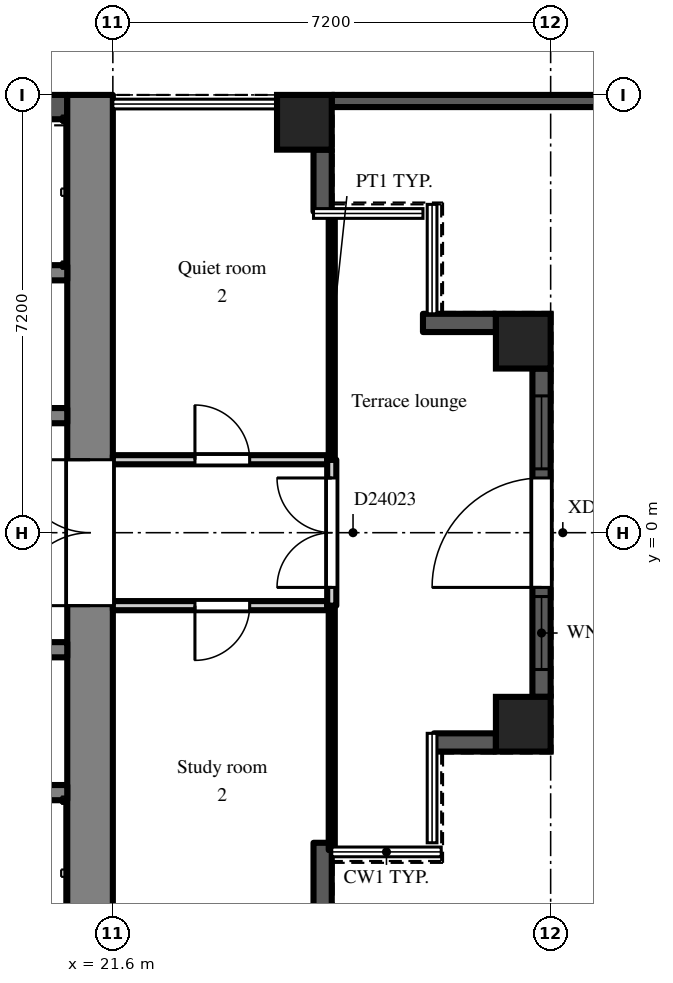
"""IFC4 building model, lengths in metres.
Left out: names, types, materials, properties, quantities, classifications, styles, units other than length and angle.
Written with IfcOpenShell. Run it as: python <this file> out.ifc"""

import sys

from ifc_helpers import new_model, si_unit, direction, frame, frame_2d, origin, origin_2d, place, context, subcontext, project, spatial, rectangle, extrude, element, fill, save


model = new_model("IFC4")
c1 = context("Model", 3, precision=1e-05, world=origin(), true_north=direction((0.0, 1.0)))
c2 = subcontext(c1, "Body", "Model", "MODEL_VIEW")
j1 = project(units=[si_unit("LENGTHUNIT", "METRE"), si_unit("PLANEANGLEUNIT", "RADIAN")], contexts=[c1])
p1 = place(None, origin())
s1 = spatial("IfcSite", under=j1, at=p1, CompositionType="ELEMENT")
p2 = place(p1, origin())
s2 = spatial("IfcBuilding", under=s1, at=p2, CompositionType="ELEMENT")
p3 = place(p2, frame((0.0, 0.0, 166.5)))
s3 = spatial("IfcBuildingStorey", under=s2, at=p3, CompositionType="ELEMENT", Elevation=166.5)
for number, where, z_axis, x_axis in (
    (1, (24.75, 6.75, 0.0), (0.0, 0.0, 1.0), (1.0, 0.0, 0.0)),
    (2, (28.35, -3.15, 0.0), (0.0, 0.0, 1.0), (1.0, 0.0, 0.0)),
    (3, (28.35, 3.15, 0.0), (0.0, 0.0, 1.0), (1.0, 0.0, 0.0)),
):
    element("IfcColumn", number, at=place(p3, frame(where, z_axis=z_axis, x_axis=x_axis)), inside=s3, PredefinedType="COLUMN", context=c2, shape_type="SweptSolid", body=[
        extrude(rectangle(XDim=0.9, YDim=0.9, at=origin_2d()), origin(), (0.0, 0.0, 1.0), 4.2),
    ])
p4 = place(p3, frame((25.05, -6.3, 0.0), z_axis=(0.0, 0.0, 1.0), x_axis=(0.0, 1.0, 0.0)))
e4 = element("IfcWall", 4, at=p4, inside=s3, PredefinedType="SOLIDWALL", context=c2, shape_type="SweptSolid", body=[
    extrude(rectangle(XDim=1.2, YDim=0.3, at=frame_2d((0.6, 0.0))), origin(), (0.0, 0.0, 1.0), 3.8),
])
p5 = place(p3, frame((26.88, -3.45, 0.0), z_axis=(0.0, 0.0, 1.0), x_axis=(1.0, 0.0, 0.0)))
e5 = element("IfcWall", 5, at=p5, inside=s3, PredefinedType="SOLIDWALL", context=c2, shape_type="SweptSolid", body=[
    extrude(rectangle(XDim=1.02, YDim=0.3, at=frame_2d((0.51, 0.0))), origin(), (0.0, 0.0, 1.0), 3.8),
])
p6 = place(p3, frame((28.65, -2.7, 0.0), z_axis=(0.0, 0.0, 1.0), x_axis=(0.0, 1.0, 0.0)))
e6 = element("IfcWall", 6, at=p6, inside=s3, PredefinedType="SOLIDWALL", context=c2, shape_type="SweptSolid", body=[
    extrude(rectangle(XDim=5.4, YDim=0.3, at=frame_2d((2.7, 0.0))), origin(), (0.0, 0.0, 1.0), 3.4),
])
p7 = place(p6, frame((1.8, 0.0, 0.0)))
e7 = element("IfcOpeningElement", 7, at=p7, cuts=e6, PredefinedType="OPENING", context=c2, shape_type="SweptSolid", body=[
    extrude(rectangle(XDim=1.8, YDim=2.05, at=frame_2d((0.9, 1.025))), frame((0.0, 0.16, 0.0), z_axis=(0.0, -1.0, 0.0), x_axis=(1.0, 0.0, 0.0)), (0.0, 0.0, 1.0), 0.32),
])
p8 = place(p6, frame((0.45, 0.0, 0.2)))
e8 = element("IfcOpeningElement", 8, at=p8, cuts=e6, PredefinedType="OPENING", context=c2, shape_type="SweptSolid", body=[
    extrude(rectangle(XDim=1.2, YDim=1.85, at=frame_2d((0.6, 0.925))), frame((0.0, 0.16, 0.0), z_axis=(0.0, -1.0, 0.0), x_axis=(1.0, 0.0, 0.0)), (0.0, 0.0, 1.0), 0.32),
])
p9 = place(p6, frame((3.75, 0.0, 0.2)))
e9 = element("IfcOpeningElement", 9, at=p9, cuts=e6, PredefinedType="OPENING", context=c2, shape_type="SweptSolid", body=[
    extrude(rectangle(XDim=1.2, YDim=1.85, at=frame_2d((0.6, 0.925))), frame((0.0, 0.16, 0.0), z_axis=(0.0, -1.0, 0.0), x_axis=(1.0, 0.0, 0.0)), (0.0, 0.0, 1.0), 0.32),
])
p10 = place(p3, frame((27.9, 3.45, 0.0), z_axis=(0.0, 0.0, 1.0), x_axis=(-1.0, 0.0, 0.0)))
e10 = element("IfcWall", 10, at=p10, inside=s3, PredefinedType="SOLIDWALL", context=c2, shape_type="SweptSolid", body=[
    extrude(rectangle(XDim=1.2, YDim=0.3, at=frame_2d((0.6, 0.0))), origin(), (0.0, 0.0, 1.0), 3.8),
])
p11 = place(p3, frame((25.05, 5.28, 0.0), z_axis=(0.0, 0.0, 1.0), x_axis=(0.0, 1.0, 0.0)))
e11 = element("IfcWall", 11, at=p11, inside=s3, PredefinedType="SOLIDWALL", context=c2, shape_type="SweptSolid", body=[
    extrude(rectangle(XDim=1.02, YDim=0.3, at=frame_2d((0.51, 0.0))), origin(), (0.0, 0.0, 1.0), 3.8),
])
p12 = place(p3, frame((39.6, 7.1, 0.0), z_axis=(0.0, 0.0, 1.0), x_axis=(-1.0, 0.0, 0.0)))
e12 = element("IfcWall", 12, at=p12, inside=s3, PredefinedType="PARAPET", context=c2, shape_type="SweptSolid", body=[
    extrude(rectangle(XDim=14.4, YDim=0.2, at=frame_2d((7.2, 0.0))), origin(), (0.0, 0.0, 1.0), 1.1),
])
p13 = place(p3, frame((21.225, -7.2, 0.0), z_axis=(0.0, 0.0, 1.0), x_axis=(0.0, 1.0, 0.0)))
e13 = element("IfcWall", 13, at=p13, inside=s3, PredefinedType="SHEAR", context=c2, shape_type="SweptSolid", body=[
    extrude(rectangle(XDim=14.4, YDim=0.75, at=frame_2d((7.2, 0.0))), origin(), (0.0, 0.0, 1.0), 3.8),
])
p14 = place(p13, frame((6.0, 0.0, 0.0)))
e14 = element("IfcOpeningElement", 14, at=p14, cuts=e13, PredefinedType="OPENING", context=c2, shape_type="SweptSolid", body=[
    extrude(rectangle(XDim=2.4, YDim=2.2, at=frame_2d((1.2, 1.1))), frame((0.0, 0.385, 0.0), z_axis=(0.0, -1.0, 0.0), x_axis=(1.0, 0.0, 0.0)), (0.0, 0.0, 1.0), 0.77),
])
p15 = place(p3, frame((7.9, 7.0, 0.0), z_axis=(0.0, 0.0, 1.0), x_axis=(1.0, 0.0, 0.0)))
e15 = element("IfcWall", 15, at=p15, inside=s3, PredefinedType="SHEAR", context=c2, shape_type="SweptSolid", body=[
    extrude(rectangle(XDim=12.95, YDim=0.4, at=frame_2d((6.475, 0.0))), origin(), (0.0, 0.0, 1.0), 3.8),
])
p16 = place(p3, frame((7.9, 1.925, 0.0), z_axis=(0.0, 0.0, 1.0), x_axis=(1.0, 0.0, 0.0)))
e16 = element("IfcWall", 16, at=p16, inside=s3, PredefinedType="SHEAR", context=c2, shape_type="SweptSolid", body=[
    extrude(rectangle(XDim=12.95, YDim=0.25, at=frame_2d((6.475, 0.0))), origin(), (0.0, 0.0, 1.0), 3.8),
])
p17 = place(p16, frame((4.825, 0.0, 0.0)))
e17 = element("IfcOpeningElement", 17, at=p17, cuts=e16, PredefinedType="OPENING", context=c2, shape_type="SweptSolid", body=[
    extrude(rectangle(XDim=1.1, YDim=2.1, at=frame_2d((0.55, 1.05))), frame((0.0, 0.135, 0.0), z_axis=(0.0, -1.0, 0.0), x_axis=(1.0, 0.0, 0.0)), (0.0, 0.0, 1.0), 0.27),
])
p18 = place(p16, frame((7.025, 0.0, 0.0)))
e18 = element("IfcOpeningElement", 18, at=p18, cuts=e16, PredefinedType="OPENING", context=c2, shape_type="SweptSolid", body=[
    extrude(rectangle(XDim=1.1, YDim=2.1, at=frame_2d((0.55, 1.05))), frame((0.0, 0.135, 0.0), z_axis=(0.0, -1.0, 0.0), x_axis=(1.0, 0.0, 0.0)), (0.0, 0.0, 1.0), 0.27),
])
p19 = place(p16, frame((9.225, 0.0, 0.0)))
e19 = element("IfcOpeningElement", 19, at=p19, cuts=e16, PredefinedType="OPENING", context=c2, shape_type="SweptSolid", body=[
    extrude(rectangle(XDim=1.1, YDim=2.1, at=frame_2d((0.55, 1.05))), frame((0.0, 0.135, 0.0), z_axis=(0.0, -1.0, 0.0), x_axis=(1.0, 0.0, 0.0)), (0.0, 0.0, 1.0), 0.27),
])
p20 = place(p16, frame((0.525, 0.0, 0.0)))
e20 = element("IfcOpeningElement", 20, at=p20, cuts=e16, PredefinedType="OPENING", context=c2, shape_type="SweptSolid", body=[
    extrude(rectangle(XDim=0.9, YDim=2.1, at=frame_2d((0.45, 1.05))), frame((0.0, 0.135, 0.0), z_axis=(0.0, -1.0, 0.0), x_axis=(1.0, 0.0, 0.0)), (0.0, 0.0, 1.0), 0.27),
])
p21 = place(p16, frame((2.575, 0.0, 0.0)))
e21 = element("IfcOpeningElement", 21, at=p21, cuts=e16, PredefinedType="OPENING", context=c2, shape_type="SweptSolid", body=[
    extrude(rectangle(XDim=1.2, YDim=2.1, at=frame_2d((0.6, 1.05))), frame((0.0, 0.135, 0.0), z_axis=(0.0, -1.0, 0.0), x_axis=(1.0, 0.0, 0.0)), (0.0, 0.0, 1.0), 0.27),
])
p22 = place(p16, frame((11.525, 0.0, 0.0)))
e22 = element("IfcOpeningElement", 22, at=p22, cuts=e16, PredefinedType="OPENING", context=c2, shape_type="SweptSolid", body=[
    extrude(rectangle(XDim=0.9, YDim=2.1, at=frame_2d((0.45, 1.05))), frame((0.0, 0.135, 0.0), z_axis=(0.0, -1.0, 0.0), x_axis=(1.0, 0.0, 0.0)), (0.0, 0.0, 1.0), 0.27),
])
p23 = place(p3, frame((12.3, 4.275, 0.0), z_axis=(0.0, 0.0, 1.0), x_axis=(1.0, 0.0, 0.0)))
e23 = element("IfcWall", 23, at=p23, inside=s3, PredefinedType="SHEAR", context=c2, shape_type="SweptSolid", body=[
    extrude(rectangle(XDim=8.55, YDim=0.25, at=frame_2d((4.275, 0.0))), origin(), (0.0, 0.0, 1.0), 3.8),
])
p24 = place(p3, frame((7.9, -1.925, 0.0), z_axis=(0.0, 0.0, 1.0), x_axis=(1.0, 0.0, 0.0)))
e24 = element("IfcWall", 24, at=p24, inside=s3, PredefinedType="SHEAR", context=c2, shape_type="SweptSolid", body=[
    extrude(rectangle(XDim=12.95, YDim=0.25, at=frame_2d((6.475, 0.0))), origin(), (0.0, 0.0, 1.0), 3.8),
])
p25 = place(p24, frame((0.525, 0.0, 0.0)))
e25 = element("IfcOpeningElement", 25, at=p25, cuts=e24, PredefinedType="OPENING", context=c2, shape_type="SweptSolid", body=[
    extrude(rectangle(XDim=0.9, YDim=2.1, at=frame_2d((0.45, 1.05))), frame((0.0, 0.135, 0.0), z_axis=(0.0, -1.0, 0.0), x_axis=(1.0, 0.0, 0.0)), (0.0, 0.0, 1.0), 0.27),
])
p26 = place(p24, frame((2.575, 0.0, 0.0)))
e26 = element("IfcOpeningElement", 26, at=p26, cuts=e24, PredefinedType="OPENING", context=c2, shape_type="SweptSolid", body=[
    extrude(rectangle(XDim=1.2, YDim=2.1, at=frame_2d((0.6, 1.05))), frame((0.0, 0.135, 0.0), z_axis=(0.0, -1.0, 0.0), x_axis=(1.0, 0.0, 0.0)), (0.0, 0.0, 1.0), 0.27),
])
p27 = place(p24, frame((4.925, 0.0, 0.0)))
e27 = element("IfcOpeningElement", 27, at=p27, cuts=e24, PredefinedType="OPENING", context=c2, shape_type="SweptSolid", body=[
    extrude(rectangle(XDim=0.9, YDim=2.1, at=frame_2d((0.45, 1.05))), frame((0.0, 0.135, 0.0), z_axis=(0.0, -1.0, 0.0), x_axis=(1.0, 0.0, 0.0)), (0.0, 0.0, 1.0), 0.27),
])
p28 = place(p24, frame((8.225, 0.0, 0.0)))
e28 = element("IfcOpeningElement", 28, at=p28, cuts=e24, PredefinedType="OPENING", context=c2, shape_type="SweptSolid", body=[
    extrude(rectangle(XDim=0.9, YDim=2.1, at=frame_2d((0.45, 1.05))), frame((0.0, 0.135, 0.0), z_axis=(0.0, -1.0, 0.0), x_axis=(1.0, 0.0, 0.0)), (0.0, 0.0, 1.0), 0.27),
])
p29 = place(p24, frame((11.525, 0.0, 0.0)))
e29 = element("IfcOpeningElement", 29, at=p29, cuts=e24, PredefinedType="OPENING", context=c2, shape_type="SweptSolid", body=[
    extrude(rectangle(XDim=0.9, YDim=2.1, at=frame_2d((0.45, 1.05))), frame((0.0, 0.135, 0.0), z_axis=(0.0, -1.0, 0.0), x_axis=(1.0, 0.0, 0.0)), (0.0, 0.0, 1.0), 0.27),
])
p30 = place(p3, frame((12.3, -4.275, 0.0), z_axis=(0.0, 0.0, 1.0), x_axis=(1.0, 0.0, 0.0)))
e30 = element("IfcWall", 30, at=p30, inside=s3, PredefinedType="SHEAR", context=c2, shape_type="SweptSolid", body=[
    extrude(rectangle(XDim=8.55, YDim=0.25, at=frame_2d((4.275, 0.0))), origin(), (0.0, 0.0, 1.0), 3.8),
])
p31 = place(p3, frame((21.6, -1.2, 0.0), z_axis=(0.0, 0.0, 1.0), x_axis=(1.0, 0.0, 0.0)))
e31 = element("IfcWall", 31, at=p31, inside=s3, PredefinedType="PARTITIONING", context=c2, shape_type="SweptSolid", body=[
    extrude(rectangle(XDim=3.525, YDim=0.15, at=frame_2d((1.762, 0.0))), origin(), (0.0, 0.0, 1.0), 3.8),
])
p32 = place(p31, frame((1.35, 0.0, 0.0)))
e32 = element("IfcOpeningElement", 32, at=p32, cuts=e31, PredefinedType="OPENING", context=c2, shape_type="SweptSolid", body=[
    extrude(rectangle(XDim=0.9, YDim=2.1, at=frame_2d((0.45, 1.05))), frame((0.0, 0.085, 0.0), z_axis=(0.0, -1.0, 0.0), x_axis=(1.0, 0.0, 0.0)), (0.0, 0.0, 1.0), 0.17),
])
p33 = place(p3, frame((21.6, 1.2, 0.0), z_axis=(0.0, 0.0, 1.0), x_axis=(1.0, 0.0, 0.0)))
e33 = element("IfcWall", 33, at=p33, inside=s3, PredefinedType="PARTITIONING", context=c2, shape_type="SweptSolid", body=[
    extrude(rectangle(XDim=3.525, YDim=0.15, at=frame_2d((1.762, 0.0))), origin(), (0.0, 0.0, 1.0), 3.8),
])
p34 = place(p33, frame((1.35, 0.0, 0.0)))
e34 = element("IfcOpeningElement", 34, at=p34, cuts=e33, PredefinedType="OPENING", context=c2, shape_type="SweptSolid", body=[
    extrude(rectangle(XDim=0.9, YDim=2.1, at=frame_2d((0.45, 1.05))), frame((0.0, 0.085, 0.0), z_axis=(0.0, -1.0, 0.0), x_axis=(1.0, 0.0, 0.0)), (0.0, 0.0, 1.0), 0.17),
])
p35 = place(p3, frame((25.2, -5.22, 0.0), z_axis=(0.0, 0.0, 1.0), x_axis=(0.0, 1.0, 0.0)))
e35 = element("IfcWall", 35, at=p35, inside=s3, PredefinedType="PARTITIONING", context=c2, shape_type="SweptSolid", body=[
    extrude(rectangle(XDim=4.02, YDim=0.1, at=frame_2d((2.01, 0.0))), origin(), (0.0, 0.0, 1.0), 3.8),
])
p36 = place(p3, frame((25.2, -1.2, 0.0), z_axis=(0.0, 0.0, 1.0), x_axis=(0.0, 1.0, 0.0)))
e36 = element("IfcWall", 36, at=p36, inside=s3, PredefinedType="PARTITIONING", context=c2, shape_type="SweptSolid", body=[
    extrude(rectangle(XDim=2.4, YDim=0.15, at=frame_2d((1.2, 0.0))), origin(), (0.0, 0.0, 1.0), 3.8),
])
p37 = place(p36, frame((0.3, 0.0, 0.0)))
e37 = element("IfcOpeningElement", 37, at=p37, cuts=e36, PredefinedType="OPENING", context=c2, shape_type="SweptSolid", body=[
    extrude(rectangle(XDim=1.8, YDim=2.1, at=frame_2d((0.9, 1.05))), frame((0.0, 0.085, 0.0), z_axis=(0.0, -1.0, 0.0), x_axis=(1.0, 0.0, 0.0)), (0.0, 0.0, 1.0), 0.17),
])
p38 = place(p3, frame((25.2, 1.2, 0.0), z_axis=(0.0, 0.0, 1.0), x_axis=(0.0, 1.0, 0.0)))
e38 = element("IfcWall", 38, at=p38, inside=s3, PredefinedType="PARTITIONING", context=c2, shape_type="SweptSolid", body=[
    extrude(rectangle(XDim=4.02, YDim=0.1, at=frame_2d((2.01, 0.0))), origin(), (0.0, 0.0, 1.0), 3.8),
])
p39 = place(p7, origin())
e39 = element("IfcDoor", 39, at=p39, inside=s3, OperationType="SINGLE_SWING_LEFT", PredefinedType="DOOR", context=c2, shape_type="SweptSolid", body=[
    extrude(rectangle(XDim=1.8, YDim=2.05, at=frame_2d((0.9, 1.025))), frame((0.0, 0.025, 0.0), z_axis=(0.0, -1.0, 0.0), x_axis=(1.0, 0.0, 0.0)), (0.0, 0.0, 1.0), 0.05),
])
fill(e7, e39)
p40 = place(p8, origin())
e40 = element("IfcWindow", 40, at=p40, inside=s3, PartitioningType="SINGLE_PANEL", PredefinedType="WINDOW", context=c2, shape_type="SweptSolid", body=[
    extrude(rectangle(XDim=1.2, YDim=1.85, at=frame_2d((0.6, 0.925))), frame((0.0, 0.03, 0.0), z_axis=(0.0, -1.0, 0.0), x_axis=(1.0, 0.0, 0.0)), (0.0, 0.0, 1.0), 0.06),
])
fill(e8, e40)
p41 = place(p9, origin())
e41 = element("IfcWindow", 41, at=p41, inside=s3, PartitioningType="SINGLE_PANEL", PredefinedType="WINDOW", context=c2, shape_type="SweptSolid", body=[
    extrude(rectangle(XDim=1.2, YDim=1.85, at=frame_2d((0.6, 0.925))), frame((0.0, 0.03, 0.0), z_axis=(0.0, -1.0, 0.0), x_axis=(1.0, 0.0, 0.0)), (0.0, 0.0, 1.0), 0.06),
])
fill(e9, e41)
p42 = place(p14, origin())
e42 = element("IfcDoor", 42, at=p42, inside=s3, OperationType="DOUBLE_DOOR_DOUBLE_SWING", PredefinedType="DOOR", context=c2, shape_type="SweptSolid", body=[
    extrude(rectangle(XDim=2.4, YDim=2.2, at=frame_2d((1.2, 1.1))), frame((0.0, 0.025, 0.0), z_axis=(0.0, -1.0, 0.0), x_axis=(1.0, 0.0, 0.0)), (0.0, 0.0, 1.0), 0.05),
])
fill(e14, e42)
p43 = place(p37, origin())
e43 = element("IfcDoor", 43, at=p43, inside=s3, OperationType="DOUBLE_DOOR_DOUBLE_SWING", PredefinedType="DOOR", context=c2, shape_type="SweptSolid", body=[
    extrude(rectangle(XDim=1.8, YDim=2.1, at=frame_2d((0.9, 1.05))), frame((0.0, 0.025, 0.0), z_axis=(0.0, -1.0, 0.0), x_axis=(1.0, 0.0, 0.0)), (0.0, 0.0, 1.0), 0.05),
])
fill(e37, e43)
p44 = place(p34, origin())
e44 = element("IfcDoor", 44, at=p44, inside=s3, OperationType="SINGLE_SWING_LEFT", PredefinedType="DOOR", context=c2, shape_type="SweptSolid", body=[
    extrude(rectangle(XDim=0.9, YDim=2.1, at=frame_2d((0.45, 1.05))), frame((0.0, 0.025, 0.0), z_axis=(0.0, -1.0, 0.0), x_axis=(1.0, 0.0, 0.0)), (0.0, 0.0, 1.0), 0.05),
])
fill(e34, e44)
p45 = place(p32, frame((0.9, 0.0, 0.0), z_axis=(0.0, 0.0, 1.0), x_axis=(-1.0, 0.0, 0.0)))
e45 = element("IfcDoor", 45, at=p45, inside=s3, OperationType="SINGLE_SWING_RIGHT", PredefinedType="DOOR", context=c2, shape_type="SweptSolid", body=[
    extrude(rectangle(XDim=0.9, YDim=2.1, at=frame_2d((0.45, 1.05))), frame((0.0, 0.025, 0.0), z_axis=(0.0, -1.0, 0.0), x_axis=(1.0, 0.0, 0.0)), (0.0, 0.0, 1.0), 0.05),
])
fill(e32, e45)
save(model, sys.argv[1])
